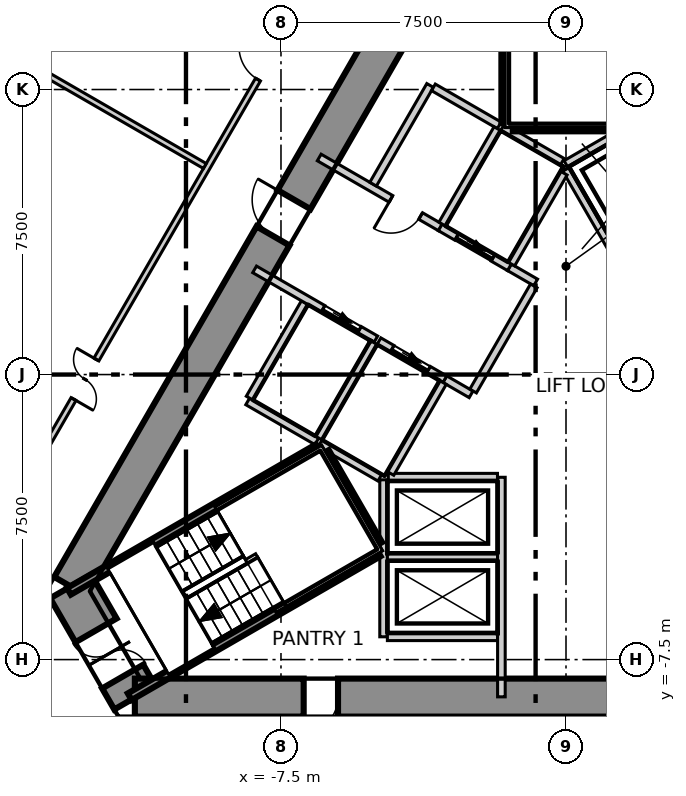
"""IFC4 building model, lengths in metres.
Left out: names, types, materials, properties, quantities, classifications, styles, units other than length and angle.
Written with IfcOpenShell. Run it as: python <this file> out.ifc"""

import sys

from ifc_helpers import new_model, si_unit, direction, frame, frame_2d, origin, place, context, subcontext, project, spatial, polyline, rectangle, outline, extrude, element, fill, save


model = new_model("IFC4")
c1 = context("Model", 3, precision=1e-05, world=origin(), true_north=direction((0.0, 1.0)))
c2 = subcontext(c1, "Body", "Model", "MODEL_VIEW")
j1 = project(units=[si_unit("LENGTHUNIT", "METRE"), si_unit("PLANEANGLEUNIT", "RADIAN")], contexts=[c1])
p1 = place(None, origin())
s1 = spatial("IfcSite", under=j1, at=p1, CompositionType="ELEMENT")
p2 = place(p1, origin())
s2 = spatial("IfcBuilding", under=s1, at=p2, CompositionType="ELEMENT")
p3 = place(p2, frame((0.0, 0.0, 180.8)))
s3 = spatial("IfcBuildingStorey", under=s2, at=p3, CompositionType="ELEMENT", Elevation=180.8)
p4 = place(p3, frame((-1.689, 14.075, -0.6), z_axis=(0.0, 0.0, 1.0), x_axis=(-0.500003116884, -0.866023604243, 0.0)))
e1 = element("IfcWall", 1, at=p4, inside=s3, PredefinedType="SHEAR", context=c2, shape_type="SweptSolid", body=[
    extrude(outline(polyline([(-0.433, -0.5), (1.53, -0.5), (3.493, -0.5), (5.456, -0.5), (7.419, -0.5), (9.382, -0.5), (11.345, -0.5), (13.308, -0.5), (15.271, -0.5), (17.234, -0.5), (19.197, -0.5), (21.16, -0.5), (23.123, -0.5), (22.257, 0.5), (20.273, 0.5), (18.289, 0.5), (16.305, 0.5), (14.321, 0.5), (12.337, 0.5), (10.353, 0.5), (8.369, 0.5), (6.385, 0.5), (4.401, 0.5), (2.417, 0.5), (0.433, 0.5), (-0.433, -0.5)])), origin(), (0.0, 0.0, 1.0), 4.5),
])
p5 = place(p4, frame((10.939, 0.0, 0.6)))
e2 = element("IfcOpeningElement", 2, at=p5, cuts=e1, PredefinedType="OPENING", context=c2, shape_type="SweptSolid", body=[
    extrude(rectangle(XDim=1.1, YDim=2.1, at=frame_2d((0.55, 1.05))), frame((0.0, 0.51, 0.0), z_axis=(0.0, -1.0, 0.0), x_axis=(1.0, 0.0, 0.0)), (0.0, 0.0, 1.0), 1.02),
])
p6 = place(p3, frame((-13.034, -5.575, -0.6), z_axis=(0.0, 0.0, 1.0), x_axis=(0.500041548022, -0.866001414694, 0.0)))
e3 = element("IfcWall", 3, at=p6, inside=s3, PredefinedType="SHEAR", context=c2, shape_type="SweptSolid", body=[
    extrude(outline(polyline([(-0.216, -0.625), (1.689, -0.625), (3.594, -0.625), (3.161, 0.625), (1.689, 0.625), (0.217, 0.625), (-0.216, -0.625)])), origin(), (0.0, 0.0, 1.0), 4.5),
])
p7 = place(p6, frame((1.336, 0.0, 0.6)))
e4 = element("IfcOpeningElement", 4, at=p7, cuts=e3, PredefinedType="OPENING", context=c2, shape_type="SweptSolid", body=[
    extrude(rectangle(XDim=1.4, YDim=2.1, at=frame_2d((0.7, 1.05))), frame((0.0, 0.635, 0.0), z_axis=(0.0, -1.0, 0.0), x_axis=(1.0, 0.0, 0.0)), (0.0, 0.0, 1.0), 1.27),
])
p8 = place(p3, frame((-11.345, -8.5, -0.6), z_axis=(0.0, 0.0, 1.0), x_axis=(1.0, 0.0, 0.0)))
e5 = element("IfcWall", 5, at=p8, inside=s3, PredefinedType="SHEAR", context=c2, shape_type="SweptSolid", body=[
    extrude(outline(polyline([(-0.433, -0.5), (1.53, -0.5), (3.493, -0.5), (5.456, -0.5), (7.419, -0.5), (9.382, -0.5), (11.345, -0.5), (13.308, -0.5), (15.271, -0.5), (17.234, -0.5), (19.197, -0.5), (21.16, -0.5), (23.123, -0.5), (22.257, 0.5), (20.273, 0.5), (18.289, 0.5), (16.305, 0.5), (14.321, 0.5), (12.337, 0.5), (10.353, 0.5), (8.369, 0.5), (6.385, 0.5), (4.401, 0.5), (2.417, 0.5), (0.433, 0.5), (-0.433, -0.5)])), origin(), (0.0, 0.0, 1.0), 4.5),
])
p9 = place(p8, frame((4.444, 0.0, 0.6)))
e6 = element("IfcOpeningElement", 6, at=p9, cuts=e5, PredefinedType="OPENING", context=c2, shape_type="SweptSolid", body=[
    extrude(rectangle(XDim=0.9, YDim=2.1, at=frame_2d((0.45, 1.05))), frame((0.0, 0.51, 0.0), z_axis=(0.0, -1.0, 0.0), x_axis=(1.0, 0.0, 0.0)), (0.0, 0.0, 1.0), 1.02),
])
p10 = place(p8, frame((17.584, 0.0, 0.6)))
e7 = element("IfcOpeningElement", 7, at=p10, cuts=e5, PredefinedType="OPENING", context=c2, shape_type="SweptSolid", body=[
    extrude(rectangle(XDim=1.0, YDim=2.1, at=frame_2d((0.5, 1.05))), frame((0.0, 0.51, 0.0), z_axis=(0.0, -1.0, 0.0), x_axis=(1.0, 0.0, 0.0)), (0.0, 0.0, 1.0), 1.02),
])
p11 = place(p3, frame((-2.909, 32.463, 0.0), z_axis=(0.0, 0.0, 1.0), x_axis=(-0.500011769953, -0.866018608292, 0.0)))
e8 = element("IfcWall", 8, at=p11, inside=s3, PredefinedType="ELEMENTEDWALL", context=c2, shape_type="SweptSolid", body=[
    extrude(rectangle(XDim=53.299, YDim=0.2, at=frame_2d((26.649, 0.0))), origin(), (0.0, 0.0, 1.0), 3.9),
])
p12 = place(p11, frame((2.022, 0.0, 0.6)))
e9 = element("IfcOpeningElement", 9, at=p12, cuts=e8, PredefinedType="OPENING", context=c2, shape_type="SweptSolid", body=[
    extrude(rectangle(XDim=4.9, YDim=3.0, at=frame_2d((2.45, 1.5))), frame((0.0, 0.11, 0.0), z_axis=(0.0, -1.0, 0.0), x_axis=(1.0, 0.0, 0.0)), (0.0, 0.0, 1.0), 0.22),
])
p13 = place(p11, frame((8.361, 0.0, 0.6)))
e10 = element("IfcOpeningElement", 10, at=p13, cuts=e8, PredefinedType="OPENING", context=c2, shape_type="SweptSolid", body=[
    extrude(rectangle(XDim=4.9, YDim=3.0, at=frame_2d((2.45, 1.5))), frame((0.0, 0.11, 0.0), z_axis=(0.0, -1.0, 0.0), x_axis=(1.0, 0.0, 0.0)), (0.0, 0.0, 1.0), 0.22),
])
p14 = place(p11, frame((14.7, 0.0, 0.6)))
e11 = element("IfcOpeningElement", 11, at=p14, cuts=e8, PredefinedType="OPENING", context=c2, shape_type="SweptSolid", body=[
    extrude(rectangle(XDim=4.9, YDim=3.0, at=frame_2d((2.45, 1.5))), frame((0.0, 0.11, 0.0), z_axis=(0.0, -1.0, 0.0), x_axis=(1.0, 0.0, 0.0)), (0.0, 0.0, 1.0), 0.22),
])
p15 = place(p11, frame((21.04, 0.0, 0.6)))
e12 = element("IfcOpeningElement", 12, at=p15, cuts=e8, PredefinedType="OPENING", context=c2, shape_type="SweptSolid", body=[
    extrude(rectangle(XDim=4.9, YDim=3.0, at=frame_2d((2.45, 1.5))), frame((0.0, 0.11, 0.0), z_axis=(0.0, -1.0, 0.0), x_axis=(1.0, 0.0, 0.0)), (0.0, 0.0, 1.0), 0.22),
])
p16 = place(p11, frame((27.379, 0.0, 0.6)))
e13 = element("IfcOpeningElement", 13, at=p16, cuts=e8, PredefinedType="OPENING", context=c2, shape_type="SweptSolid", body=[
    extrude(rectangle(XDim=4.9, YDim=3.0, at=frame_2d((2.45, 1.5))), frame((0.0, 0.11, 0.0), z_axis=(0.0, -1.0, 0.0), x_axis=(1.0, 0.0, 0.0)), (0.0, 0.0, 1.0), 0.22),
])
p17 = place(p11, frame((33.718, 0.0, 0.6)))
e14 = element("IfcOpeningElement", 14, at=p17, cuts=e8, PredefinedType="OPENING", context=c2, shape_type="SweptSolid", body=[
    extrude(rectangle(XDim=4.9, YDim=3.0, at=frame_2d((2.45, 1.5))), frame((0.0, 0.11, 0.0), z_axis=(0.0, -1.0, 0.0), x_axis=(1.0, 0.0, 0.0)), (0.0, 0.0, 1.0), 0.22),
])
p18 = place(p11, frame((40.057, 0.0, 0.6)))
e15 = element("IfcOpeningElement", 15, at=p18, cuts=e8, PredefinedType="OPENING", context=c2, shape_type="SweptSolid", body=[
    extrude(rectangle(XDim=4.9, YDim=3.0, at=frame_2d((2.45, 1.5))), frame((0.0, 0.11, 0.0), z_axis=(0.0, -1.0, 0.0), x_axis=(1.0, 0.0, 0.0)), (0.0, 0.0, 1.0), 0.22),
])
p19 = place(p11, frame((46.396, 0.0, 0.6)))
e16 = element("IfcOpeningElement", 16, at=p19, cuts=e8, PredefinedType="OPENING", context=c2, shape_type="SweptSolid", body=[
    extrude(rectangle(XDim=4.9, YDim=3.0, at=frame_2d((2.45, 1.5))), frame((0.0, 0.11, 0.0), z_axis=(0.0, -1.0, 0.0), x_axis=(1.0, 0.0, 0.0)), (0.0, 0.0, 1.0), 0.22),
])
p20 = place(p3, frame((-15.877, -5.7, 0.0), z_axis=(0.0, 0.0, 1.0), x_axis=(0.500001771058, 0.866024381261, 0.0)))
e17 = element("IfcWall", 17, at=p20, inside=s3, PredefinedType="PARTITIONING", context=c2, shape_type="SweptSolid", body=[
    extrude(rectangle(XDim=25.75, YDim=0.15, at=frame_2d((12.875, 0.0))), origin(), (0.0, 0.0, 1.0), 3.9),
])
p21 = place(p20, frame((21.882, 0.0, 0.0)))
e18 = element("IfcOpeningElement", 18, at=p21, cuts=e17, PredefinedType="OPENING", context=c2, shape_type="SweptSolid", body=[
    extrude(rectangle(XDim=1.2, YDim=2.1, at=frame_2d((0.6, 1.05))), frame((0.0, 0.085, 0.0), z_axis=(0.0, -1.0, 0.0), x_axis=(1.0, 0.0, 0.0)), (0.0, 0.0, 1.0), 0.17),
])
p22 = place(p20, frame((15.545, 0.0, 0.0)))
e19 = element("IfcOpeningElement", 19, at=p22, cuts=e17, PredefinedType="OPENING", context=c2, shape_type="SweptSolid", body=[
    extrude(rectangle(XDim=1.0, YDim=2.1, at=frame_2d((0.5, 1.05))), frame((0.0, 0.085, 0.0), z_axis=(0.0, -1.0, 0.0), x_axis=(1.0, 0.0, 0.0)), (0.0, 0.0, 1.0), 0.17),
])
p23 = place(p20, frame((5.838, 0.0, 0.0)))
e20 = element("IfcOpeningElement", 20, at=p23, cuts=e17, PredefinedType="OPENING", context=c2, shape_type="SweptSolid", body=[
    extrude(rectangle(XDim=1.2, YDim=2.1, at=frame_2d((0.6, 1.05))), frame((0.0, 0.085, 0.0), z_axis=(0.0, -1.0, 0.0), x_axis=(1.0, 0.0, 0.0)), (0.0, 0.0, 1.0), 0.17),
])
p24 = place(p3, frame((-16.238, 9.376, 0.0), z_axis=(0.0, 0.0, 1.0), x_axis=(0.8660261172, -0.499998764326, 0.0)))
e21 = element("IfcWall", 21, at=p24, inside=s3, PredefinedType="PARTITIONING", context=c2, shape_type="SweptSolid", body=[
    extrude(rectangle(XDim=7.776, YDim=0.15, at=frame_2d((3.888, 0.0))), origin(), (0.0, 0.0, 1.0), 3.4),
])
p25 = place(p3, frame((-8.376, -0.707, 0.0), z_axis=(0.0, 0.0, 1.0), x_axis=(0.866067520717, -0.499927044236, 0.0)))
e22 = element("IfcWall", 22, at=p25, inside=s3, PredefinedType="SOLIDWALL", context=c2, shape_type="SweptSolid", body=[
    extrude(rectangle(XDim=2.1, YDim=0.2, at=frame_2d((1.05, 0.0))), origin(), (0.0, 0.0, 1.0), 3.9),
])
p26 = place(p3, frame((-8.326, -0.62, 0.0), z_axis=(0.0, 0.0, 1.0), x_axis=(0.500023687443, 0.866011727401, 0.0)))
e23 = element("IfcWall", 23, at=p26, inside=s3, PredefinedType="SOLIDWALL", context=c2, shape_type="SweptSolid", body=[
    extrude(rectangle(XDim=2.9, YDim=0.2, at=frame_2d((1.45, 0.0))), origin(), (0.0, 0.0, 1.0), 3.9),
])
p27 = place(p3, frame((-4.8, -6.9, 0.0), z_axis=(0.0, 0.0, 1.0), x_axis=(0.0, 1.0, 0.0)))
e24 = element("IfcWall", 24, at=p27, inside=s3, PredefinedType="SOLIDWALL", context=c2, shape_type="SweptSolid", body=[
    extrude(rectangle(XDim=4.131, YDim=0.2, at=frame_2d((2.065, 0.0))), origin(), (0.0, 0.0, 1.0), 3.9),
])
for number, where, z_axis, x_axis in (
    (25, (-4.7, -6.9, 0.0), (0.0, 0.0, 1.0), (1.0, 0.0, 0.0)),
    (26, (-4.7, -4.8, 0.0), (0.0, 0.0, 1.0), (1.0, 0.0, 0.0)),
):
    element("IfcWall", number, at=place(p3, frame(where, z_axis=z_axis, x_axis=x_axis)), inside=s3, PredefinedType="SOLIDWALL", context=c2, shape_type="SweptSolid", body=[
        extrude(rectangle(XDim=2.9, YDim=0.2, at=frame_2d((1.45, 0.0))), origin(), (0.0, 0.0, 1.0), 3.9),
    ])
p28 = place(p3, frame((-1.7, -8.48, 0.0), z_axis=(0.0, 0.0, 1.0), x_axis=(0.0, 1.0, 0.0)))
e27 = element("IfcWall", 27, at=p28, inside=s3, PredefinedType="SOLIDWALL", context=c2, shape_type="SweptSolid", body=[
    extrude(rectangle(XDim=5.777, YDim=0.2, at=frame_2d((2.889, 0.0))), origin(), (0.0, 0.0, 1.0), 3.9),
])
p29 = place(p3, frame((-4.676, -2.7, 0.0), z_axis=(0.0, 0.0, 1.0), x_axis=(1.0, 0.0, 0.0)))
e28 = element("IfcWall", 28, at=p29, inside=s3, PredefinedType="SOLIDWALL", context=c2, shape_type="SweptSolid", body=[
    extrude(rectangle(XDim=2.873, YDim=0.2, at=frame_2d((1.437, 0.0))), origin(), (0.0, 0.0, 1.0), 3.9),
])
p30 = place(p3, frame((-0.002, 5.541, 0.0), z_axis=(0.0, 0.0, 1.0), x_axis=(0.86600155993, 0.500041296494, 0.0)))
e29 = element("IfcWall", 29, at=p30, inside=s3, PredefinedType="SOLIDWALL", context=c2, shape_type="SweptSolid", body=[
    extrude(rectangle(XDim=4.132, YDim=0.2, at=frame_2d((2.066, 0.0))), origin(), (0.0, 0.0, 1.0), 3.9),
])
p31 = place(p3, frame((0.0, 5.4, 0.0), z_axis=(0.0, 0.0, 1.0), x_axis=(0.500103862429, -0.865965430478, 0.0)))
e30 = element("IfcWall", 30, at=p31, inside=s3, PredefinedType="SOLIDWALL", context=c2, shape_type="SweptSolid", body=[
    extrude(rectangle(XDim=2.973, YDim=0.2, at=frame_2d((1.487, 0.0))), origin(), (0.0, 0.0, 1.0), 3.9),
])
p32 = place(p3, frame((-8.194, 2.768, 0.0), z_axis=(0.0, 0.0, 1.0), x_axis=(0.866052002351, -0.499953927102, 0.0)))
e31 = element("IfcWall", 31, at=p32, inside=s3, PredefinedType="SOLIDWALL", context=c2, shape_type="SweptSolid", body=[
    extrude(rectangle(XDim=3.682, YDim=0.2, at=frame_2d((1.841, 0.0))), origin(), (0.0, 0.0, 1.0), 3.9),
])
p33 = place(p32, frame((2.08, 0.0, 0.0)))
e32 = element("IfcOpeningElement", 32, at=p33, cuts=e31, PredefinedType="OPENING", context=c2, shape_type="SweptSolid", body=[
    extrude(rectangle(XDim=1.1, YDim=2.1, at=frame_2d((0.55, 1.05))), frame((0.0, 0.11, 0.0), z_axis=(0.0, -1.0, 0.0), x_axis=(1.0, 0.0, 0.0)), (0.0, 0.0, 1.0), 0.22),
])
p34 = place(p3, frame((-3.188, -0.122, 0.0), z_axis=(0.0, 0.0, 1.0), x_axis=(0.865705793592, -0.50055317294, 0.0)))
e33 = element("IfcWall", 33, at=p34, inside=s3, PredefinedType="SOLIDWALL", context=c2, shape_type="SweptSolid", body=[
    extrude(rectangle(XDim=0.797, YDim=0.2, at=frame_2d((0.398, 0.0))), origin(), (0.0, 0.0, 1.0), 3.9),
])
p35 = place(p3, frame((-6.494, 5.712, 0.0), z_axis=(0.0, 0.0, 1.0), x_axis=(0.866064137879, -0.499932904579, 0.0)))
e34 = element("IfcWall", 34, at=p35, inside=s3, PredefinedType="SOLIDWALL", context=c2, shape_type="SweptSolid", body=[
    extrude(rectangle(XDim=3.682, YDim=0.2, at=frame_2d((1.841, 0.0))), origin(), (0.0, 0.0, 1.0), 3.9),
])
p36 = place(p35, frame((2.18, 0.0, 0.0)))
e35 = element("IfcOpeningElement", 35, at=p36, cuts=e34, PredefinedType="OPENING", context=c2, shape_type="SweptSolid", body=[
    extrude(rectangle(XDim=0.9, YDim=2.1, at=frame_2d((0.45, 1.05))), frame((0.0, 0.11, 0.0), z_axis=(0.0, -1.0, 0.0), x_axis=(1.0, 0.0, 0.0)), (0.0, 0.0, 1.0), 0.22),
])
p37 = place(p3, frame((-1.488, 2.822, 0.0), z_axis=(0.0, 0.0, 1.0), x_axis=(0.866236612152, -0.499633997809, 0.0)))
e36 = element("IfcWall", 36, at=p37, inside=s3, PredefinedType="SOLIDWALL", context=c2, shape_type="SweptSolid", body=[
    extrude(rectangle(XDim=0.796, YDim=0.2, at=frame_2d((0.398, 0.0))), origin(), (0.0, 0.0, 1.0), 3.9),
])
p38 = place(p3, frame((-5.076, 5.009, 0.0), z_axis=(0.0, 0.0, 1.0), x_axis=(0.50002537861, 0.866010750942, 0.0)))
e37 = element("IfcWall", 37, at=p38, inside=s3, PredefinedType="SOLIDWALL", context=c2, shape_type="SweptSolid", body=[
    extrude(rectangle(XDim=3.0, YDim=0.2, at=frame_2d((1.5, 0.0))), origin(), (0.0, 0.0, 1.0), 3.9),
])
p39 = place(p3, frame((-3.489, 7.557, 0.0), z_axis=(0.0, 0.0, 1.0), x_axis=(0.866010750942, -0.50002537861, 0.0)))
e38 = element("IfcWall", 38, at=p39, inside=s3, PredefinedType="SOLIDWALL", context=c2, shape_type="SweptSolid", body=[
    extrude(rectangle(XDim=2.0, YDim=0.2, at=frame_2d((1.0, 0.0))), origin(), (0.0, 0.0, 1.0), 3.9),
])
p40 = place(p3, frame((-2.444, -0.433, 0.0), z_axis=(0.0, 0.0, 1.0), x_axis=(0.500035624827, 0.866004834804, 0.0)))
e39 = element("IfcWall", 39, at=p40, inside=s3, PredefinedType="SOLIDWALL", context=c2, shape_type="SweptSolid", body=[
    extrude(rectangle(XDim=3.194, YDim=0.2, at=frame_2d((1.597, 0.0))), origin(), (0.0, 0.0, 1.0), 3.9),
])
p41 = place(p3, frame((-6.507, -1.67, 0.0), z_axis=(0.0, 0.0, 1.0), x_axis=(0.50012328804, 0.865954211699, 0.0)))
e40 = element("IfcWall", 40, at=p41, inside=s3, PredefinedType="SOLIDWALL", context=c2, shape_type="SweptSolid", body=[
    extrude(rectangle(XDim=2.9, YDim=0.2, at=frame_2d((1.45, 0.0))), origin(), (0.0, 0.0, 1.0), 3.9),
])
p42 = place(p3, frame((-6.47, -1.807, 0.0), z_axis=(0.0, 0.0, 1.0), x_axis=(0.865883195159, -0.500246231712, 0.0)))
e41 = element("IfcWall", 41, at=p42, inside=s3, PredefinedType="SOLIDWALL", context=c2, shape_type="SweptSolid", body=[
    extrude(rectangle(XDim=1.815, YDim=0.2, at=frame_2d((0.908, 0.0))), origin(), (0.0, 0.0, 1.0), 3.9),
])
p43 = place(p3, frame((-4.922, 0.879, 0.0), z_axis=(0.0, 0.0, 1.0), x_axis=(0.866073918653, -0.499915960366, 0.0)))
e42 = element("IfcWall", 42, at=p43, inside=s3, PredefinedType="SOLIDWALL", context=c2, shape_type="SweptSolid", body=[
    extrude(rectangle(XDim=2.002, YDim=0.2, at=frame_2d((1.001, 0.0))), origin(), (0.0, 0.0, 1.0), 3.9),
])
p44 = place(p43, frame((0.402, 0.0, 0.0)))
e43 = element("IfcOpeningElement", 43, at=p44, cuts=e42, PredefinedType="OPENING", context=c2, shape_type="SweptSolid", body=[
    extrude(rectangle(XDim=1.1, YDim=2.1, at=frame_2d((0.55, 1.05))), frame((0.0, 0.11, 0.0), z_axis=(0.0, -1.0, 0.0), x_axis=(1.0, 0.0, 0.0)), (0.0, 0.0, 1.0), 0.22),
])
p45 = place(p3, frame((-4.619, -2.6, 0.0), z_axis=(0.0, 0.0, 1.0), x_axis=(0.50009492287, 0.865970593103, 0.0)))
e44 = element("IfcWall", 44, at=p45, inside=s3, PredefinedType="SOLIDWALL", context=c2, shape_type="SweptSolid", body=[
    extrude(rectangle(XDim=2.761, YDim=0.2, at=frame_2d((1.381, 0.0))), origin(), (0.0, 0.0, 1.0), 3.9),
])
p46 = place(p3, frame((-3.309, 3.873, 0.0), z_axis=(0.0, 0.0, 1.0), x_axis=(0.866098583652, -0.499873227325, 0.0)))
e45 = element("IfcWall", 45, at=p46, inside=s3, PredefinedType="SOLIDWALL", context=c2, shape_type="SweptSolid", body=[
    extrude(rectangle(XDim=2.103, YDim=0.2, at=frame_2d((1.051, 0.0))), origin(), (0.0, 0.0, 1.0), 3.9),
])
p47 = place(p46, frame((0.502, 0.0, 0.0)))
e46 = element("IfcOpeningElement", 46, at=p47, cuts=e45, PredefinedType="OPENING", context=c2, shape_type="SweptSolid", body=[
    extrude(rectangle(XDim=1.1, YDim=2.1, at=frame_2d((0.55, 1.05))), frame((0.0, 0.11, 0.0), z_axis=(0.0, -1.0, 0.0), x_axis=(1.0, 0.0, 0.0)), (0.0, 0.0, 1.0), 0.22),
])
p48 = place(p3, frame((-3.257, 3.959, 0.0), z_axis=(0.0, 0.0, 1.0), x_axis=(0.50012328804, 0.865954211699, 0.0)))
e47 = element("IfcWall", 47, at=p48, inside=s3, PredefinedType="SOLIDWALL", context=c2, shape_type="SweptSolid", body=[
    extrude(rectangle(XDim=2.9, YDim=0.2, at=frame_2d((1.45, 0.0))), origin(), (0.0, 0.0, 1.0), 3.9),
])
p49 = place(p3, frame((-1.67, 6.507, 0.0), z_axis=(0.0, 0.0, 1.0), x_axis=(0.865941441609, -0.500145398563, 0.0)))
e48 = element("IfcWall", 48, at=p49, inside=s3, PredefinedType="SOLIDWALL", context=c2, shape_type="SweptSolid", body=[
    extrude(rectangle(XDim=1.815, YDim=0.2, at=frame_2d((0.908, 0.0))), origin(), (0.0, 0.0, 1.0), 3.9),
])
p50 = place(p3, frame((-1.438, 2.909, 0.0), z_axis=(0.0, 0.0, 1.0), x_axis=(0.499829630636, 0.866123744241, 0.0)))
e49 = element("IfcWall", 49, at=p50, inside=s3, PredefinedType="SOLIDWALL", context=c2, shape_type="SweptSolid", body=[
    extrude(rectangle(XDim=2.761, YDim=0.2, at=frame_2d((1.38, 0.0))), origin(), (0.0, 0.0, 1.0), 3.9),
])
p51 = place(p3, frame((-13.08, -5.704, 0.0), z_axis=(0.0, 0.0, 1.0), x_axis=(0.866039934834, 0.499974830638, 0.0)))
e50 = element("IfcWall", 50, at=p51, inside=s3, PredefinedType="SOLIDWALL", context=c2, shape_type="SweptSolid", body=[
    extrude(rectangle(XDim=7.564, YDim=0.2, at=frame_2d((3.782, 0.0))), origin(), (0.0, 0.0, 1.0), 3.9),
])
p52 = place(p3, frame((-6.329, -2.038, 0.0), z_axis=(0.0, 0.0, 1.0), x_axis=(0.500200581029, -0.865909567298, 0.0)))
e51 = element("IfcWall", 51, at=p52, inside=s3, PredefinedType="SOLIDWALL", context=c2, shape_type="SweptSolid", body=[
    extrude(rectangle(XDim=2.799, YDim=0.2, at=frame_2d((1.399, 0.0))), origin(), (0.0, 0.0, 1.0), 3.9),
])
p53 = place(p3, frame((-11.48, -8.476, 0.0), z_axis=(0.0, 0.0, 1.0), x_axis=(0.865984032653, 0.500071650056, 0.0)))
e52 = element("IfcWall", 52, at=p53, inside=s3, PredefinedType="SOLIDWALL", context=c2, shape_type="SweptSolid", body=[
    extrude(rectangle(XDim=7.565, YDim=0.2, at=frame_2d((3.782, 0.0))), origin(), (0.0, 0.0, 1.0), 3.9),
])
p54 = place(p3, frame((-1.4, 6.5, 0.0), z_axis=(0.0, 0.0, 1.0), x_axis=(1.0, 0.0, 0.0)))
e53 = element("IfcWall", 53, at=p54, inside=s3, PredefinedType="SOLIDWALL", context=c2, shape_type="SweptSolid", body=[
    extrude(rectangle(XDim=2.8, YDim=0.2, at=frame_2d((1.4, 0.0))), origin(), (0.0, 0.0, 1.0), 3.9),
])
p55 = place(p3, frame((-1.6, 6.615, 0.0), z_axis=(0.0, 0.0, 1.0), x_axis=(0.0, 1.0, 0.0)))
e54 = element("IfcWall", 54, at=p55, inside=s3, PredefinedType="SOLIDWALL", context=c2, shape_type="SweptSolid", body=[
    extrude(rectangle(XDim=7.565, YDim=0.2, at=frame_2d((3.782, 0.0))), origin(), (0.0, 0.0, 1.0), 3.9),
])
p56 = place(p44, origin())
e55 = element("IfcDoor", 55, at=p56, inside=s3, OperationType="SLIDING_TO_LEFT", PredefinedType="DOOR", context=c2, shape_type="SweptSolid", body=[
    extrude(rectangle(XDim=1.1, YDim=2.1, at=frame_2d((0.55, 1.05))), frame((0.0, 0.025, 0.0), z_axis=(0.0, -1.0, 0.0), x_axis=(1.0, 0.0, 0.0)), (0.0, 0.0, 1.0), 0.05),
])
fill(e43, e55)
p57 = place(p47, origin())
e56 = element("IfcDoor", 56, at=p57, inside=s3, OperationType="SLIDING_TO_LEFT", PredefinedType="DOOR", context=c2, shape_type="SweptSolid", body=[
    extrude(rectangle(XDim=1.1, YDim=2.1, at=frame_2d((0.55, 1.05))), frame((0.0, 0.025, 0.0), z_axis=(0.0, -1.0, 0.0), x_axis=(1.0, 0.0, 0.0)), (0.0, 0.0, 1.0), 0.05),
])
fill(e46, e56)
p58 = place(p33, origin())
e57 = element("IfcDoor", 57, at=p58, inside=s3, OperationType="SLIDING_TO_LEFT", PredefinedType="DOOR", context=c2, shape_type="SweptSolid", body=[
    extrude(rectangle(XDim=1.1, YDim=2.1, at=frame_2d((0.55, 1.05))), frame((0.0, 0.025, 0.0), z_axis=(0.0, -1.0, 0.0), x_axis=(1.0, 0.0, 0.0)), (0.0, 0.0, 1.0), 0.05),
])
fill(e32, e57)
p59 = place(p36, origin())
e58 = element("IfcDoor", 58, at=p59, inside=s3, OperationType="SINGLE_SWING_LEFT", PredefinedType="DOOR", context=c2, shape_type="SweptSolid", body=[
    extrude(rectangle(XDim=0.9, YDim=2.1, at=frame_2d((0.45, 1.05))), frame((0.0, 0.025, 0.0), z_axis=(0.0, -1.0, 0.0), x_axis=(1.0, 0.0, 0.0)), (0.0, 0.0, 1.0), 0.05),
])
fill(e35, e58)
p60 = place(p22, origin())
e59 = element("IfcDoor", 59, at=p60, inside=s3, OperationType="SINGLE_SWING_LEFT", PredefinedType="DOOR", context=c2, shape_type="SweptSolid", body=[
    extrude(rectangle(XDim=1.0, YDim=2.1, at=frame_2d((0.5, 1.05))), frame((0.0, 0.025, 0.0), z_axis=(0.0, -1.0, 0.0), x_axis=(1.0, 0.0, 0.0)), (0.0, 0.0, 1.0), 0.05),
])
fill(e19, e59)
p61 = place(p23, origin())
e60 = element("IfcDoor", 60, at=p61, inside=s3, OperationType="DOUBLE_DOOR_SINGLE_SWING", PredefinedType="DOOR", context=c2, shape_type="SweptSolid", body=[
    extrude(rectangle(XDim=1.2, YDim=2.1, at=frame_2d((0.6, 1.05))), frame((0.0, 0.025, 0.0), z_axis=(0.0, -1.0, 0.0), x_axis=(1.0, 0.0, 0.0)), (0.0, 0.0, 1.0), 0.05),
])
fill(e20, e60)
p62 = place(p7, origin())
e61 = element("IfcDoor", 61, at=p62, inside=s3, OperationType="DOUBLE_DOOR_SINGLE_SWING", PredefinedType="DOOR", context=c2, shape_type="SweptSolid", body=[
    extrude(rectangle(XDim=1.4, YDim=2.1, at=frame_2d((0.7, 1.05))), frame((0.0, 0.025, 0.0), z_axis=(0.0, -1.0, 0.0), x_axis=(1.0, 0.0, 0.0)), (0.0, 0.0, 1.0), 0.05),
])
fill(e4, e61)
p63 = place(p5, origin())
e62 = element("IfcDoor", 62, at=p63, inside=s3, OperationType="SINGLE_SWING_LEFT", PredefinedType="DOOR", context=c2, shape_type="SweptSolid", body=[
    extrude(rectangle(XDim=1.1, YDim=2.1, at=frame_2d((0.55, 1.05))), frame((0.0, 0.025, 0.0), z_axis=(0.0, -1.0, 0.0), x_axis=(1.0, 0.0, 0.0)), (0.0, 0.0, 1.0), 0.05),
])
fill(e2, e62)
p64 = place(p9, origin())
e63 = element("IfcDoor", 63, at=p64, inside=s3, OperationType="SINGLE_SWING_LEFT", PredefinedType="DOOR", context=c2, shape_type="SweptSolid", body=[
    extrude(rectangle(XDim=0.9, YDim=2.1, at=frame_2d((0.45, 1.05))), frame((0.0, 0.025, 0.0), z_axis=(0.0, -1.0, 0.0), x_axis=(1.0, 0.0, 0.0)), (0.0, 0.0, 1.0), 0.05),
])
fill(e6, e63)
save(model, sys.argv[1])
